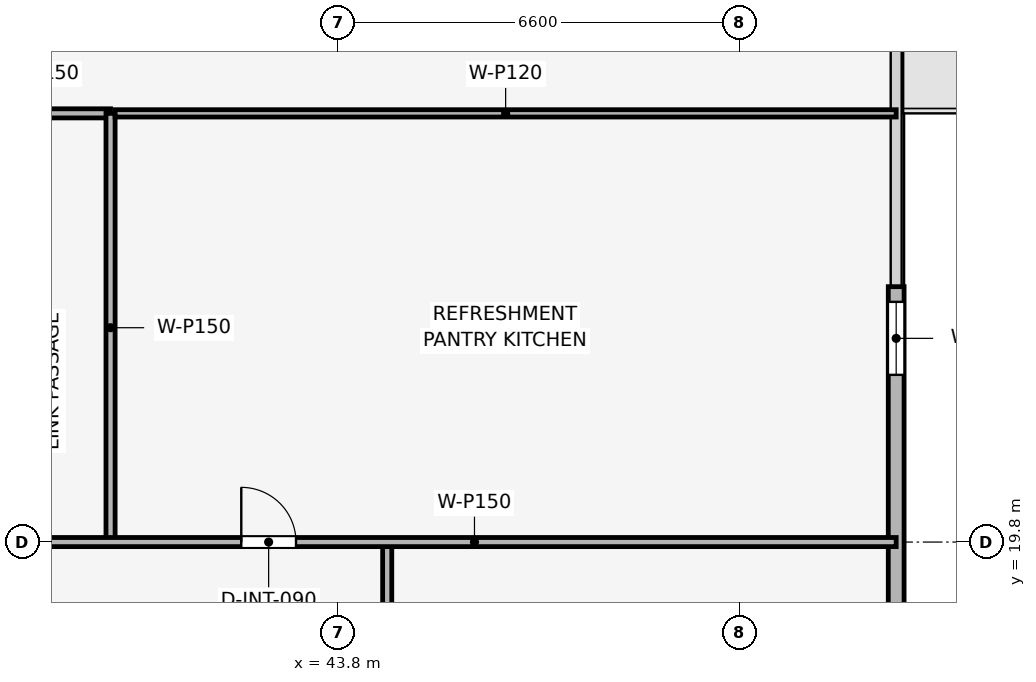
"""IFC4 building model, lengths in metres.
Left out: names, types, materials, properties, quantities, classifications, styles, units other than length and angle.
Written with IfcOpenShell. Run it as: python <this file> out.ifc"""

import sys

from ifc_helpers import new_model, si_unit, direction, frame, frame_2d, origin, place, context, subcontext, project, spatial, rectangle, extrude, element, fill, save


model = new_model("IFC4")
c1 = context("Model", 3, precision=1e-05, world=origin(), true_north=direction((0.0, 1.0)))
c2 = subcontext(c1, "Body", "Model", "MODEL_VIEW")
j1 = project(units=[si_unit("LENGTHUNIT", "METRE"), si_unit("PLANEANGLEUNIT", "RADIAN")], contexts=[c1])
p1 = place(None, origin())
s1 = spatial("IfcSite", under=j1, at=p1, CompositionType="ELEMENT")
p2 = place(p1, origin())
s2 = spatial("IfcBuilding", under=s1, at=p2, CompositionType="ELEMENT")
p3 = place(p2, frame((0.0, 0.0, 157.05)))
s3 = spatial("IfcBuildingStorey", under=s2, at=p3, CompositionType="ELEMENT", Elevation=157.05)
p4 = place(p3, frame((52.97, 24.0, 0.0), z_axis=(0.0, 0.0, 1.0), x_axis=(0.0, -1.0, 0.0)))
e1 = element("IfcWall", 1, at=p4, inside=s3, PredefinedType="SOLIDWALL", context=c2, shape_type="SweptSolid", body=[
    extrude(rectangle(XDim=12.6, YDim=0.26, at=frame_2d((6.3, 0.0))), origin(), (0.0, 0.0, 1.0), 3.495),
])
p5 = place(p4, frame((0.25, 0.0, 0.9)))
e2 = element("IfcOpeningElement", 2, at=p5, cuts=e1, PredefinedType="OPENING", context=c2, shape_type="SweptSolid", body=[
    extrude(rectangle(XDim=1.2, YDim=2.1, at=frame_2d((0.6, 1.05))), frame((0.0, 0.14, 0.0), z_axis=(0.0, -1.0, 0.0), x_axis=(1.0, 0.0, 0.0)), (0.0, 0.0, 1.0), 0.28),
])
p6 = place(p3, frame((37.8, 26.85, 0.0), z_axis=(0.0, 0.0, 1.0), x_axis=(1.0, 0.0, 0.0)))
e3 = element("IfcWall", 3, at=p6, inside=s3, PredefinedType="PARTITIONING", context=c2, shape_type="SweptSolid", body=[
    extrude(rectangle(XDim=2.25, YDim=0.15, at=frame_2d((1.125, 0.0))), origin(), (0.0, 0.0, 1.0), 3.495),
])
p7 = place(p3, frame((40.05, 19.8, 0.0), z_axis=(0.0, 0.0, 1.0), x_axis=(0.0, 1.0, 0.0)))
e4 = element("IfcWall", 4, at=p7, inside=s3, PredefinedType="PARTITIONING", context=c2, shape_type="SweptSolid", body=[
    extrude(rectangle(XDim=7.05, YDim=0.15, at=frame_2d((3.525, 0.0))), origin(), (0.0, 0.0, 1.0), 3.03),
])
p8 = place(p3, frame((40.125, 26.85, 0.0), z_axis=(0.0, 0.0, 1.0), x_axis=(1.0, 0.0, 0.0)))
e5 = element("IfcWall", 5, at=p8, inside=s3, PredefinedType="PARTITIONING", context=c2, shape_type="SweptSolid", body=[
    extrude(rectangle(XDim=12.845, YDim=0.12, at=frame_2d((6.422, 0.0))), origin(), (0.0, 0.0, 1.0), 2.98),
])
p9 = place(p3, frame((44.6, 17.4, 0.0), z_axis=(0.0, 0.0, 1.0), x_axis=(0.0, 1.0, 0.0)))
e6 = element("IfcWall", 6, at=p9, inside=s3, PredefinedType="PARTITIONING", context=c2, shape_type="SweptSolid", body=[
    extrude(rectangle(XDim=2.4, YDim=0.15, at=frame_2d((1.2, 0.0))), origin(), (0.0, 0.0, 1.0), 3.495),
])
p10 = place(p3, frame((37.8, 19.8, 0.0), z_axis=(0.0, 0.0, 1.0), x_axis=(1.0, 0.0, 0.0)))
e7 = element("IfcWall", 7, at=p10, inside=s3, PredefinedType="PARTITIONING", context=c2, shape_type="SweptSolid", body=[
    extrude(rectangle(XDim=15.17, YDim=0.15, at=frame_2d((7.585, 0.0))), origin(), (0.0, 0.0, 1.0), 2.98),
])
p11 = place(p10, frame((4.4, 0.0, 0.0)))
e8 = element("IfcOpeningElement", 8, at=p11, cuts=e7, PredefinedType="OPENING", context=c2, shape_type="SweptSolid", body=[
    extrude(rectangle(XDim=0.9, YDim=2.1, at=frame_2d((0.45, 1.05))), frame((0.0, 0.085, 0.0), z_axis=(0.0, -1.0, 0.0), x_axis=(1.0, 0.0, 0.0)), (0.0, 0.0, 1.0), 0.17),
])
p12 = place(p5, origin())
e9 = element("IfcWindow", 9, at=p12, inside=s3, PartitioningType="SINGLE_PANEL", PredefinedType="WINDOW", context=c2, shape_type="SweptSolid", body=[
    extrude(rectangle(XDim=1.2, YDim=2.1, at=frame_2d((0.6, 1.05))), frame((0.0, 0.03, 0.0), z_axis=(0.0, -1.0, 0.0), x_axis=(1.0, 0.0, 0.0)), (0.0, 0.0, 1.0), 0.06),
])
fill(e2, e9)
p13 = place(p11, origin())
e10 = element("IfcDoor", 10, at=p13, inside=s3, OperationType="SINGLE_SWING_LEFT", PredefinedType="DOOR", context=c2, shape_type="SweptSolid", body=[
    extrude(rectangle(XDim=0.9, YDim=2.1, at=frame_2d((0.45, 1.05))), frame((0.0, 0.025, 0.0), z_axis=(0.0, -1.0, 0.0), x_axis=(1.0, 0.0, 0.0)), (0.0, 0.0, 1.0), 0.05),
])
fill(e8, e10)
save(model, sys.argv[1])
